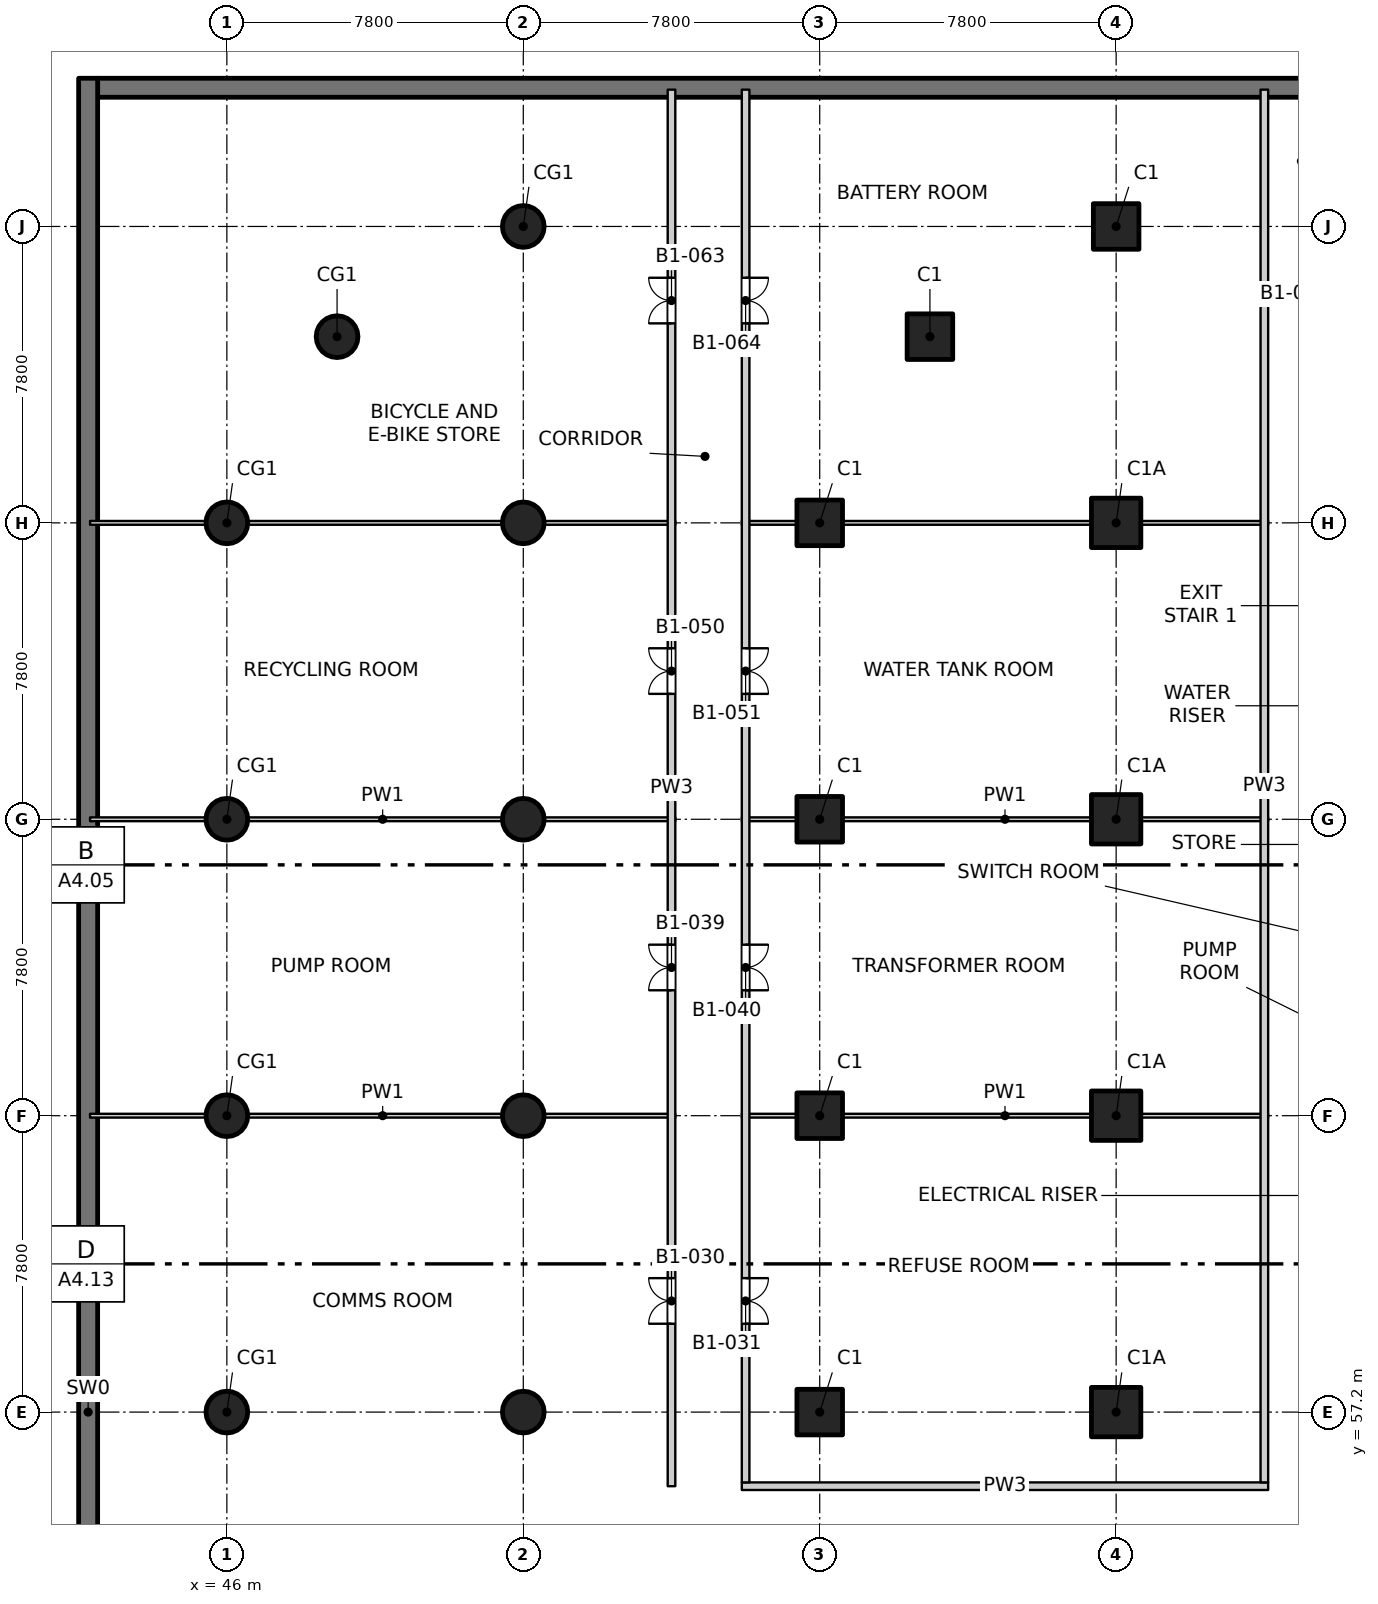
"""IFC4 building model, lengths in metres.
Left out: names, types, materials, properties, quantities, classifications, styles, units other than length and angle.
Written with IfcOpenShell. Run it as: python <this file> out.ifc"""

import sys

from ifc_helpers import new_model, si_unit, direction, frame, frame_2d, origin, origin_2d, place, context, subcontext, project, spatial, rectangle, circle, extrude, element, fill, save


model = new_model("IFC4")
c1 = context("Model", 3, precision=1e-05, world=origin(), true_north=direction((0.0, 1.0)))
c2 = subcontext(c1, "Body", "Model", "MODEL_VIEW")
j1 = project(units=[si_unit("LENGTHUNIT", "METRE"), si_unit("PLANEANGLEUNIT", "RADIAN")], contexts=[c1])
p1 = place(None, origin())
s1 = spatial("IfcSite", under=j1, at=p1, CompositionType="ELEMENT")
p2 = place(p1, origin())
s2 = spatial("IfcBuilding", under=s1, at=p2, CompositionType="ELEMENT")
p3 = place(p2, frame((0.0, 0.0, -4.5)))
s3 = spatial("IfcBuildingStorey", under=s2, at=p3, CompositionType="ELEMENT", Elevation=-4.5)
p4 = place(p3, frame((42.6, 92.05, -0.35), z_axis=(0.0, 0.0, 1.0), x_axis=(1.0, 0.0, 0.0)))
e1 = element("IfcWall", 1, at=p4, inside=s3, PredefinedType="SOLIDWALL", context=c2, shape_type="SweptSolid", body=[
    extrude(rectangle(XDim=84.8, YDim=0.5, at=frame_2d((42.4, 0.0))), origin(), (0.0, 0.0, 1.0), 4.45),
])
p5 = place(p3, frame((42.35, 22.1, -0.35), z_axis=(0.0, 0.0, 1.0), x_axis=(0.0, 1.0, 0.0)))
e2 = element("IfcWall", 2, at=p5, inside=s3, PredefinedType="SOLIDWALL", context=c2, shape_type="SweptSolid", body=[
    extrude(rectangle(XDim=70.2, YDim=0.5, at=frame_2d((35.1, 0.0))), origin(), (0.0, 0.0, 1.0), 4.45),
])
for number, where, z_axis, x_axis in (
    (3, (64.5, 85.5, -0.35), (0.0, 0.0, 1.0), (1.0, 0.0, 0.0)),
    (4, (69.4, 88.4, -0.35), (0.0, 0.0, 1.0), (1.0, 0.0, 0.0)),
    (5, (61.6, 57.2, -0.35), (0.0, 0.0, 1.0), (1.0, 0.0, 0.0)),
    (6, (61.6, 65.0, -0.35), (0.0, 0.0, 1.0), (1.0, 0.0, 0.0)),
    (7, (61.6, 72.8, -0.35), (0.0, 0.0, 1.0), (1.0, 0.0, 0.0)),
    (8, (61.6, 80.6, -0.35), (0.0, 0.0, 1.0), (1.0, 0.0, 0.0)),
):
    element("IfcColumn", number, at=place(p3, frame(where, z_axis=z_axis, x_axis=x_axis)), inside=s3, PredefinedType="COLUMN", context=c2, shape_type="SweptSolid", body=[
        extrude(rectangle(XDim=1.2, YDim=1.2, at=origin_2d()), origin(), (0.0, 0.0, 1.0), 4.45),
    ])
for number, where, z_axis, x_axis in (
    (9, (69.4, 57.2, -0.35), (0.0, 0.0, 1.0), (1.0, 0.0, 0.0)),
    (10, (69.4, 65.0, -0.35), (0.0, 0.0, 1.0), (1.0, 0.0, 0.0)),
    (11, (69.4, 72.8, -0.35), (0.0, 0.0, 1.0), (1.0, 0.0, 0.0)),
    (12, (69.4, 80.6, -0.35), (0.0, 0.0, 1.0), (1.0, 0.0, 0.0)),
):
    element("IfcColumn", number, at=place(p3, frame(where, z_axis=z_axis, x_axis=x_axis)), inside=s3, PredefinedType="COLUMN", context=c2, shape_type="SweptSolid", body=[
        extrude(rectangle(XDim=1.3, YDim=1.3, at=origin_2d()), origin(), (0.0, 0.0, 1.0), 4.45),
    ])
for number, where, z_axis, x_axis in (
    (13, (46.0, 57.2, -0.35), (0.0, 0.0, 1.0), (1.0, 0.0, 0.0)),
    (14, (46.0, 65.0, -0.35), (0.0, 0.0, 1.0), (1.0, 0.0, 0.0)),
    (15, (46.0, 72.8, -0.35), (0.0, 0.0, 1.0), (1.0, 0.0, 0.0)),
    (16, (46.0, 80.6, -0.35), (0.0, 0.0, 1.0), (1.0, 0.0, 0.0)),
    (17, (48.9, 85.5, -0.35), (0.0, 0.0, 1.0), (1.0, 0.0, 0.0)),
    (18, (53.8, 57.2, -0.35), (0.0, 0.0, 1.0), (1.0, 0.0, 0.0)),
    (19, (53.8, 65.0, -0.35), (0.0, 0.0, 1.0), (1.0, 0.0, 0.0)),
    (20, (53.8, 72.8, -0.35), (0.0, 0.0, 1.0), (1.0, 0.0, 0.0)),
    (21, (53.8, 80.6, -0.35), (0.0, 0.0, 1.0), (1.0, 0.0, 0.0)),
    (22, (53.8, 88.4, -0.35), (0.0, 0.0, 1.0), (1.0, 0.0, 0.0)),
):
    element("IfcColumn", number, at=place(p3, frame(where, z_axis=z_axis, x_axis=x_axis)), inside=s3, PredefinedType="COLUMN", context=c2, shape_type="SweptSolid", body=[
        extrude(circle(Radius=0.55, at=origin_2d()), origin(), (0.0, 0.0, 1.0), 4.45),
    ])
p6 = place(p3, frame((59.55, 55.25, 0.0), z_axis=(0.0, 0.0, 1.0), x_axis=(1.0, 0.0, 0.0)))
e23 = element("IfcWall", 23, at=p6, inside=s3, PredefinedType="PARTITIONING", context=c2, shape_type="SweptSolid", body=[
    extrude(rectangle(XDim=13.85, YDim=0.2, at=frame_2d((6.925, 0.0))), origin(), (0.0, 0.0, 1.0), 4.1),
])
p7 = place(p3, frame((42.4, 65.0, 0.0), z_axis=(0.0, 0.0, 1.0), x_axis=(1.0, 0.0, 0.0)))
e24 = element("IfcWall", 24, at=p7, inside=s3, PredefinedType="PARTITIONING", context=c2, shape_type="SweptSolid", body=[
    extrude(rectangle(XDim=15.4, YDim=0.1, at=frame_2d((7.7, 0.0))), origin(), (0.0, 0.0, 1.0), 4.1),
])
p8 = place(p3, frame((59.55, 65.0, 0.0), z_axis=(0.0, 0.0, 1.0), x_axis=(1.0, 0.0, 0.0)))
e25 = element("IfcWall", 25, at=p8, inside=s3, PredefinedType="PARTITIONING", context=c2, shape_type="SweptSolid", body=[
    extrude(rectangle(XDim=13.85, YDim=0.1, at=frame_2d((6.925, 0.0))), origin(), (0.0, 0.0, 1.0), 4.1),
])
p9 = place(p3, frame((42.4, 72.8, 0.0), z_axis=(0.0, 0.0, 1.0), x_axis=(1.0, 0.0, 0.0)))
e26 = element("IfcWall", 26, at=p9, inside=s3, PredefinedType="PARTITIONING", context=c2, shape_type="SweptSolid", body=[
    extrude(rectangle(XDim=15.4, YDim=0.1, at=frame_2d((7.7, 0.0))), origin(), (0.0, 0.0, 1.0), 4.1),
])
p10 = place(p3, frame((59.55, 72.8, 0.0), z_axis=(0.0, 0.0, 1.0), x_axis=(1.0, 0.0, 0.0)))
e27 = element("IfcWall", 27, at=p10, inside=s3, PredefinedType="PARTITIONING", context=c2, shape_type="SweptSolid", body=[
    extrude(rectangle(XDim=13.85, YDim=0.1, at=frame_2d((6.925, 0.0))), origin(), (0.0, 0.0, 1.0), 4.1),
])
p11 = place(p3, frame((42.4, 80.6, 0.0), z_axis=(0.0, 0.0, 1.0), x_axis=(1.0, 0.0, 0.0)))
e28 = element("IfcWall", 28, at=p11, inside=s3, PredefinedType="PARTITIONING", context=c2, shape_type="SweptSolid", body=[
    extrude(rectangle(XDim=15.4, YDim=0.1, at=frame_2d((7.7, 0.0))), origin(), (0.0, 0.0, 1.0), 4.1),
])
p12 = place(p3, frame((59.55, 80.6, 0.0), z_axis=(0.0, 0.0, 1.0), x_axis=(1.0, 0.0, 0.0)))
e29 = element("IfcWall", 29, at=p12, inside=s3, PredefinedType="PARTITIONING", context=c2, shape_type="SweptSolid", body=[
    extrude(rectangle(XDim=13.85, YDim=0.1, at=frame_2d((6.925, 0.0))), origin(), (0.0, 0.0, 1.0), 4.1),
])
p13 = place(p3, frame((57.7, 55.25, 0.0), z_axis=(0.0, 0.0, 1.0), x_axis=(0.0, 1.0, 0.0)))
e30 = element("IfcWall", 30, at=p13, inside=s3, PredefinedType="PARTITIONING", context=c2, shape_type="SweptSolid", body=[
    extrude(rectangle(XDim=36.75, YDim=0.2, at=frame_2d((18.375, 0.0))), origin(), (0.0, 0.0, 1.0), 4.1),
])
p14 = place(p13, frame((4.275, 0.0, 0.0)))
e31 = element("IfcOpeningElement", 31, at=p14, cuts=e30, PredefinedType="OPENING", context=c2, shape_type="SweptSolid", body=[
    extrude(rectangle(XDim=1.2, YDim=2.1, at=frame_2d((0.6, 1.05))), frame((0.0, 0.11, 0.0), z_axis=(0.0, -1.0, 0.0), x_axis=(1.0, 0.0, 0.0)), (0.0, 0.0, 1.0), 0.22),
])
p15 = place(p13, frame((13.05, 0.0, 0.0)))
e32 = element("IfcOpeningElement", 32, at=p15, cuts=e30, PredefinedType="OPENING", context=c2, shape_type="SweptSolid", body=[
    extrude(rectangle(XDim=1.2, YDim=2.1, at=frame_2d((0.6, 1.05))), frame((0.0, 0.11, 0.0), z_axis=(0.0, -1.0, 0.0), x_axis=(1.0, 0.0, 0.0)), (0.0, 0.0, 1.0), 0.22),
])
p16 = place(p13, frame((20.85, 0.0, 0.0)))
e33 = element("IfcOpeningElement", 33, at=p16, cuts=e30, PredefinedType="OPENING", context=c2, shape_type="SweptSolid", body=[
    extrude(rectangle(XDim=1.2, YDim=2.1, at=frame_2d((0.6, 1.05))), frame((0.0, 0.11, 0.0), z_axis=(0.0, -1.0, 0.0), x_axis=(1.0, 0.0, 0.0)), (0.0, 0.0, 1.0), 0.22),
])
p17 = place(p13, frame((30.6, 0.0, 0.0)))
e34 = element("IfcOpeningElement", 34, at=p17, cuts=e30, PredefinedType="OPENING", context=c2, shape_type="SweptSolid", body=[
    extrude(rectangle(XDim=1.2, YDim=2.1, at=frame_2d((0.6, 1.05))), frame((0.0, 0.11, 0.0), z_axis=(0.0, -1.0, 0.0), x_axis=(1.0, 0.0, 0.0)), (0.0, 0.0, 1.0), 0.22),
])
p18 = place(p3, frame((59.65, 55.35, 0.0), z_axis=(0.0, 0.0, 1.0), x_axis=(0.0, 1.0, 0.0)))
e35 = element("IfcWall", 35, at=p18, inside=s3, PredefinedType="PARTITIONING", context=c2, shape_type="SweptSolid", body=[
    extrude(rectangle(XDim=36.65, YDim=0.2, at=frame_2d((18.325, 0.0))), origin(), (0.0, 0.0, 1.0), 4.1),
])
p19 = place(p18, frame((4.175, 0.0, 0.0)))
e36 = element("IfcOpeningElement", 36, at=p19, cuts=e35, PredefinedType="OPENING", context=c2, shape_type="SweptSolid", body=[
    extrude(rectangle(XDim=1.2, YDim=2.1, at=frame_2d((0.6, 1.05))), frame((0.0, 0.11, 0.0), z_axis=(0.0, -1.0, 0.0), x_axis=(1.0, 0.0, 0.0)), (0.0, 0.0, 1.0), 0.22),
])
p20 = place(p18, frame((12.95, 0.0, 0.0)))
e37 = element("IfcOpeningElement", 37, at=p20, cuts=e35, PredefinedType="OPENING", context=c2, shape_type="SweptSolid", body=[
    extrude(rectangle(XDim=1.2, YDim=2.1, at=frame_2d((0.6, 1.05))), frame((0.0, 0.11, 0.0), z_axis=(0.0, -1.0, 0.0), x_axis=(1.0, 0.0, 0.0)), (0.0, 0.0, 1.0), 0.22),
])
p21 = place(p18, frame((20.75, 0.0, 0.0)))
e38 = element("IfcOpeningElement", 38, at=p21, cuts=e35, PredefinedType="OPENING", context=c2, shape_type="SweptSolid", body=[
    extrude(rectangle(XDim=1.2, YDim=2.1, at=frame_2d((0.6, 1.05))), frame((0.0, 0.11, 0.0), z_axis=(0.0, -1.0, 0.0), x_axis=(1.0, 0.0, 0.0)), (0.0, 0.0, 1.0), 0.22),
])
p22 = place(p18, frame((30.5, 0.0, 0.0)))
e39 = element("IfcOpeningElement", 39, at=p22, cuts=e35, PredefinedType="OPENING", context=c2, shape_type="SweptSolid", body=[
    extrude(rectangle(XDim=1.2, YDim=2.1, at=frame_2d((0.6, 1.05))), frame((0.0, 0.11, 0.0), z_axis=(0.0, -1.0, 0.0), x_axis=(1.0, 0.0, 0.0)), (0.0, 0.0, 1.0), 0.22),
])
p23 = place(p3, frame((73.3, 55.35, 0.0), z_axis=(0.0, 0.0, 1.0), x_axis=(0.0, 1.0, 0.0)))
e40 = element("IfcWall", 40, at=p23, inside=s3, PredefinedType="PARTITIONING", context=c2, shape_type="SweptSolid", body=[
    extrude(rectangle(XDim=36.65, YDim=0.2, at=frame_2d((18.325, 0.0))), origin(), (0.0, 0.0, 1.0), 4.1),
])
p24 = place(p14, origin())
e41 = element("IfcDoor", 41, at=p24, inside=s3, OperationType="DOUBLE_DOOR_SINGLE_SWING", PredefinedType="DOOR", context=c2, shape_type="SweptSolid", body=[
    extrude(rectangle(XDim=1.2, YDim=2.1, at=frame_2d((0.6, 1.05))), frame((0.0, 0.025, 0.0), z_axis=(0.0, -1.0, 0.0), x_axis=(1.0, 0.0, 0.0)), (0.0, 0.0, 1.0), 0.05),
])
fill(e31, e41)
p25 = place(p19, origin())
e42 = element("IfcDoor", 42, at=p25, inside=s3, OperationType="DOUBLE_DOOR_SINGLE_SWING", PredefinedType="DOOR", context=c2, shape_type="SweptSolid", body=[
    extrude(rectangle(XDim=1.2, YDim=2.1, at=frame_2d((0.6, 1.05))), frame((0.0, 0.025, 0.0), z_axis=(0.0, -1.0, 0.0), x_axis=(1.0, 0.0, 0.0)), (0.0, 0.0, 1.0), 0.05),
])
fill(e36, e42)
p26 = place(p15, origin())
e43 = element("IfcDoor", 43, at=p26, inside=s3, OperationType="DOUBLE_DOOR_SINGLE_SWING", PredefinedType="DOOR", context=c2, shape_type="SweptSolid", body=[
    extrude(rectangle(XDim=1.2, YDim=2.1, at=frame_2d((0.6, 1.05))), frame((0.0, 0.025, 0.0), z_axis=(0.0, -1.0, 0.0), x_axis=(1.0, 0.0, 0.0)), (0.0, 0.0, 1.0), 0.05),
])
fill(e32, e43)
p27 = place(p20, origin())
e44 = element("IfcDoor", 44, at=p27, inside=s3, OperationType="DOUBLE_DOOR_SINGLE_SWING", PredefinedType="DOOR", context=c2, shape_type="SweptSolid", body=[
    extrude(rectangle(XDim=1.2, YDim=2.1, at=frame_2d((0.6, 1.05))), frame((0.0, 0.025, 0.0), z_axis=(0.0, -1.0, 0.0), x_axis=(1.0, 0.0, 0.0)), (0.0, 0.0, 1.0), 0.05),
])
fill(e37, e44)
p28 = place(p16, origin())
e45 = element("IfcDoor", 45, at=p28, inside=s3, OperationType="DOUBLE_DOOR_SINGLE_SWING", PredefinedType="DOOR", context=c2, shape_type="SweptSolid", body=[
    extrude(rectangle(XDim=1.2, YDim=2.1, at=frame_2d((0.6, 1.05))), frame((0.0, 0.025, 0.0), z_axis=(0.0, -1.0, 0.0), x_axis=(1.0, 0.0, 0.0)), (0.0, 0.0, 1.0), 0.05),
])
fill(e33, e45)
p29 = place(p21, origin())
e46 = element("IfcDoor", 46, at=p29, inside=s3, OperationType="DOUBLE_DOOR_SINGLE_SWING", PredefinedType="DOOR", context=c2, shape_type="SweptSolid", body=[
    extrude(rectangle(XDim=1.2, YDim=2.1, at=frame_2d((0.6, 1.05))), frame((0.0, 0.025, 0.0), z_axis=(0.0, -1.0, 0.0), x_axis=(1.0, 0.0, 0.0)), (0.0, 0.0, 1.0), 0.05),
])
fill(e38, e46)
p30 = place(p17, origin())
e47 = element("IfcDoor", 47, at=p30, inside=s3, OperationType="DOUBLE_DOOR_SINGLE_SWING", PredefinedType="DOOR", context=c2, shape_type="SweptSolid", body=[
    extrude(rectangle(XDim=1.2, YDim=2.1, at=frame_2d((0.6, 1.05))), frame((0.0, 0.025, 0.0), z_axis=(0.0, -1.0, 0.0), x_axis=(1.0, 0.0, 0.0)), (0.0, 0.0, 1.0), 0.05),
])
fill(e34, e47)
p31 = place(p22, origin())
e48 = element("IfcDoor", 48, at=p31, inside=s3, OperationType="DOUBLE_DOOR_SINGLE_SWING", PredefinedType="DOOR", context=c2, shape_type="SweptSolid", body=[
    extrude(rectangle(XDim=1.2, YDim=2.1, at=frame_2d((0.6, 1.05))), frame((0.0, 0.025, 0.0), z_axis=(0.0, -1.0, 0.0), x_axis=(1.0, 0.0, 0.0)), (0.0, 0.0, 1.0), 0.05),
])
fill(e39, e48)
save(model, sys.argv[1])
